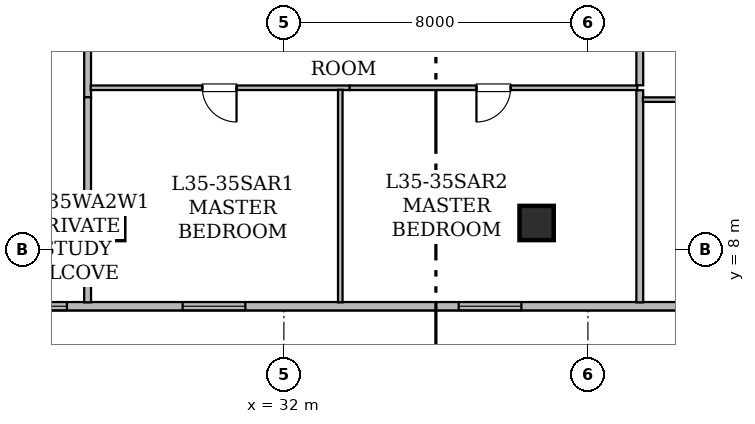
"""IFC4 building model, lengths in metres.
Left out: names, types, materials, properties, quantities, classifications, styles, units other than length and angle.
Written with IfcOpenShell. Run it as: python <this file> out.ifc"""

import sys

from ifc_helpers import new_model, si_unit, direction, frame, frame_2d, origin, origin_2d, place, context, subcontext, project, spatial, rectangle, hollow_rectangle, extrude, element, fill, save


model = new_model("IFC4")
c1 = context("Model", 3, precision=1e-05, world=origin(), true_north=direction((0.0, 1.0)))
c2 = subcontext(c1, "Body", "Model", "MODEL_VIEW")
j1 = project(units=[si_unit("LENGTHUNIT", "METRE"), si_unit("PLANEANGLEUNIT", "RADIAN")], contexts=[c1])
p1 = place(None, origin())
s1 = spatial("IfcSite", under=j1, at=p1, CompositionType="ELEMENT")
p2 = place(p1, origin())
s2 = spatial("IfcBuilding", under=s1, at=p2, CompositionType="ELEMENT")
p3 = place(p2, frame((0.0, 0.0, 138.4)))
s3 = spatial("IfcBuildingStorey", under=s2, at=p3, CompositionType="ELEMENT", Elevation=138.4)
for number, where, z_axis, x_axis in (
    (1, (27.35, 8.7, 0.0), (0.0, 0.0, 1.0), (1.0, 0.0, 0.0)),
    (2, (38.65, 8.7, 0.0), (0.0, 0.0, 1.0), (1.0, 0.0, 0.0)),
):
    element("IfcColumn", number, at=place(p3, frame(where, z_axis=z_axis, x_axis=x_axis)), inside=s3, PredefinedType="COLUMN", context=c2, shape_type="SweptSolid", body=[
        extrude(hollow_rectangle(XDim=0.9, YDim=0.9, WallThickness=0.045, at=origin_2d()), origin(), (0.0, 0.0, 1.0), 3.65),
    ])
p4 = place(p3, frame((52.283, 6.51, 0.0), z_axis=(0.0, 0.0, 1.0), x_axis=(-1.0, 0.0, 0.0)))
e3 = element("IfcWall", 3, at=p4, inside=s3, PredefinedType="STANDARD", context=c2, shape_type="SweptSolid", body=[
    extrude(rectangle(XDim=38.568, YDim=0.22, at=frame_2d((19.284, 0.0))), origin(), (0.0, 0.0, 1.0), 3.43),
])
p5 = place(p4, frame((34.581, 0.0, 0.85)))
e4 = element("IfcOpeningElement", 4, at=p5, cuts=e3, PredefinedType="OPENING", context=c2, shape_type="SweptSolid", body=[
    extrude(rectangle(XDim=1.65, YDim=1.55, at=frame_2d((0.825, 0.775))), frame((0.0, 0.12, 0.0), z_axis=(0.0, -1.0, 0.0), x_axis=(1.0, 0.0, 0.0)), (0.0, 0.0, 1.0), 0.24),
])
p6 = place(p4, frame((25.992, 0.0, 0.85)))
e5 = element("IfcOpeningElement", 5, at=p6, cuts=e3, PredefinedType="OPENING", context=c2, shape_type="SweptSolid", body=[
    extrude(rectangle(XDim=1.65, YDim=1.55, at=frame_2d((0.825, 0.775))), frame((0.0, 0.12, 0.0), z_axis=(0.0, -1.0, 0.0), x_axis=(1.0, 0.0, 0.0)), (0.0, 0.0, 1.0), 0.24),
])
p7 = place(p4, frame((28.375, 0.0, 0.8)))
e6 = element("IfcOpeningElement", 6, at=p7, cuts=e3, PredefinedType="OPENING", context=c2, shape_type="SweptSolid", body=[
    extrude(rectangle(XDim=1.2, YDim=1.5, at=frame_2d((0.6, 0.75))), frame((0.0, 0.12, 0.0), z_axis=(0.0, -1.0, 0.0), x_axis=(1.0, 0.0, 0.0)), (0.0, 0.0, 1.0), 0.24),
])
p8 = place(p4, frame((30.784, 0.0, 0.85)))
e7 = element("IfcOpeningElement", 7, at=p8, cuts=e3, PredefinedType="OPENING", context=c2, shape_type="SweptSolid", body=[
    extrude(rectangle(XDim=1.65, YDim=1.55, at=frame_2d((0.825, 0.775))), frame((0.0, 0.12, 0.0), z_axis=(0.0, -1.0, 0.0), x_axis=(1.0, 0.0, 0.0)), (0.0, 0.0, 1.0), 0.24),
])
p9 = place(p4, frame((21.298, 0.0, 0.85)))
e8 = element("IfcOpeningElement", 8, at=p9, cuts=e3, PredefinedType="OPENING", context=c2, shape_type="SweptSolid", body=[
    extrude(rectangle(XDim=1.65, YDim=1.55, at=frame_2d((0.825, 0.775))), frame((0.0, 0.12, 0.0), z_axis=(0.0, -1.0, 0.0), x_axis=(1.0, 0.0, 0.0)), (0.0, 0.0, 1.0), 0.24),
])
p10 = place(p4, frame((14.033, 0.0, 0.85)))
e9 = element("IfcOpeningElement", 9, at=p10, cuts=e3, PredefinedType="OPENING", context=c2, shape_type="SweptSolid", body=[
    extrude(rectangle(XDim=1.65, YDim=1.55, at=frame_2d((0.825, 0.775))), frame((0.0, 0.12, 0.0), z_axis=(0.0, -1.0, 0.0), x_axis=(1.0, 0.0, 0.0)), (0.0, 0.0, 1.0), 0.24),
])
p11 = place(p4, frame((6.688, 0.0, 0.85)))
e10 = element("IfcOpeningElement", 10, at=p11, cuts=e3, PredefinedType="OPENING", context=c2, shape_type="SweptSolid", body=[
    extrude(rectangle(XDim=1.65, YDim=1.55, at=frame_2d((0.825, 0.775))), frame((0.0, 0.12, 0.0), z_axis=(0.0, -1.0, 0.0), x_axis=(1.0, 0.0, 0.0)), (0.0, 0.0, 1.0), 0.24),
])
p12 = place(p4, frame((0.587, 0.0, 0.85)))
e11 = element("IfcOpeningElement", 11, at=p12, cuts=e3, PredefinedType="OPENING", context=c2, shape_type="SweptSolid", body=[
    extrude(rectangle(XDim=1.65, YDim=1.55, at=frame_2d((0.825, 0.775))), frame((0.0, 0.12, 0.0), z_axis=(0.0, -1.0, 0.0), x_axis=(1.0, 0.0, 0.0)), (0.0, 0.0, 1.0), 0.24),
])
p13 = place(p3, frame((26.835, 14.087, 0.0), z_axis=(0.0, 0.0, 1.0), x_axis=(0.0, -1.0, 0.0)))
e12 = element("IfcWall", 12, at=p13, inside=s3, PredefinedType="STANDARD", context=c2, shape_type="SweptSolid", body=[
    extrude(rectangle(XDim=2.078, YDim=0.18, at=frame_2d((1.039, 0.0))), origin(), (0.0, 0.0, 1.0), 3.43),
])
p14 = place(p3, frame((26.835, 12.009, 0.0), z_axis=(0.0, 0.0, 1.0), x_axis=(0.0, -1.0, 0.0)))
e13 = element("IfcWall", 13, at=p14, inside=s3, PredefinedType="STANDARD", context=c2, shape_type="SweptSolid", body=[
    extrude(rectangle(XDim=5.397, YDim=0.18, at=frame_2d((2.698, 0.0))), origin(), (0.0, 0.0, 1.0), 2.876),
])
p15 = place(p3, frame((33.734, 12.258, 0.0), z_axis=(0.0, 0.0, 1.0), x_axis=(-1.0, 0.0, 0.0)))
e14 = element("IfcWall", 14, at=p15, inside=s3, PredefinedType="PARTITIONING", context=c2, shape_type="SweptSolid", body=[
    extrude(rectangle(XDim=6.817, YDim=0.12, at=frame_2d((3.408, 0.0))), origin(), (0.0, 0.0, 1.0), 2.647),
])
p16 = place(p15, frame((2.98, 0.0, 0.0)))
e15 = element("IfcOpeningElement", 15, at=p16, cuts=e14, PredefinedType="OPENING", context=c2, shape_type="SweptSolid", body=[
    extrude(rectangle(XDim=0.9, YDim=2.1, at=frame_2d((0.45, 1.05))), frame((0.0, 0.07, 0.0), z_axis=(0.0, -1.0, 0.0), x_axis=(1.0, 0.0, 0.0)), (0.0, 0.0, 1.0), 0.14),
])
p17 = place(p3, frame((41.3, 12.258, 0.0), z_axis=(0.0, 0.0, 1.0), x_axis=(-1.0, 0.0, 0.0)))
e16 = element("IfcWall", 16, at=p17, inside=s3, PredefinedType="PARTITIONING", context=c2, shape_type="SweptSolid", body=[
    extrude(rectangle(XDim=7.566, YDim=0.12, at=frame_2d((3.783, 0.0))), origin(), (0.0, 0.0, 1.0), 2.647),
])
p18 = place(p17, frame((3.333, 0.0, 0.0)))
e17 = element("IfcOpeningElement", 17, at=p18, cuts=e16, PredefinedType="OPENING", context=c2, shape_type="SweptSolid", body=[
    extrude(rectangle(XDim=0.9, YDim=2.1, at=frame_2d((0.45, 1.05))), frame((0.0, 0.07, 0.0), z_axis=(0.0, -1.0, 0.0), x_axis=(1.0, 0.0, 0.0)), (0.0, 0.0, 1.0), 0.14),
])
p19 = place(p3, frame((41.365, 13.773, 0.0), z_axis=(0.0, 0.0, 1.0), x_axis=(0.0, -1.0, 0.0)))
e18 = element("IfcWall", 18, at=p19, inside=s3, PredefinedType="STANDARD", context=c2, shape_type="SweptSolid", body=[
    extrude(rectangle(XDim=1.45, YDim=0.18, at=frame_2d((0.725, 0.0))), origin(), (0.0, 0.0, 1.0), 3.43),
])
p20 = place(p3, frame((33.484, 12.204, 0.0), z_axis=(0.0, 0.0, 1.0), x_axis=(0.0, -1.0, 0.0)))
e19 = element("IfcWall", 19, at=p20, inside=s3, PredefinedType="PARTITIONING", context=c2, shape_type="SweptSolid", body=[
    extrude(rectangle(XDim=5.592, YDim=0.12, at=frame_2d((2.796, 0.0))), origin(), (0.0, 0.0, 1.0), 2.876),
])
p21 = place(p3, frame((41.365, 12.193, 0.0), z_axis=(0.0, 0.0, 1.0), x_axis=(0.0, -1.0, 0.0)))
e20 = element("IfcWall", 20, at=p21, inside=s3, PredefinedType="STANDARD", context=c2, shape_type="SweptSolid", body=[
    extrude(rectangle(XDim=5.581, YDim=0.18, at=frame_2d((2.791, 0.0))), origin(), (0.0, 0.0, 1.0), 2.876),
])
p22 = place(p3, frame((41.447, 11.946, 0.0), z_axis=(0.0, 0.0, 1.0), x_axis=(1.0, 0.0, 0.0)))
e21 = element("IfcWall", 21, at=p22, inside=s3, PredefinedType="PARTITIONING", context=c2, shape_type="SweptSolid", body=[
    extrude(rectangle(XDim=6.674, YDim=0.12, at=frame_2d((3.337, 0.0))), origin(), (0.0, 0.0, 1.0), 3.43),
])
p23 = place(p6, origin())
e22 = element("IfcWindow", 22, at=p23, inside=s3, PartitioningType="SINGLE_PANEL", PredefinedType="WINDOW", context=c2, shape_type="SweptSolid", body=[
    extrude(rectangle(XDim=1.65, YDim=1.55, at=frame_2d((0.825, 0.775))), frame((0.0, 0.03, 0.0), z_axis=(0.0, -1.0, 0.0), x_axis=(1.0, 0.0, 0.0)), (0.0, 0.0, 1.0), 0.06),
])
fill(e5, e22)
p24 = place(p9, origin())
e23 = element("IfcWindow", 23, at=p24, inside=s3, PartitioningType="SINGLE_PANEL", PredefinedType="WINDOW", context=c2, shape_type="SweptSolid", body=[
    extrude(rectangle(XDim=1.65, YDim=1.55, at=frame_2d((0.825, 0.775))), frame((0.0, 0.03, 0.0), z_axis=(0.0, -1.0, 0.0), x_axis=(1.0, 0.0, 0.0)), (0.0, 0.0, 1.0), 0.06),
])
fill(e8, e23)
p25 = place(p10, origin())
e24 = element("IfcWindow", 24, at=p25, inside=s3, PartitioningType="SINGLE_PANEL", PredefinedType="WINDOW", context=c2, shape_type="SweptSolid", body=[
    extrude(rectangle(XDim=1.65, YDim=1.55, at=frame_2d((0.825, 0.775))), frame((0.0, 0.03, 0.0), z_axis=(0.0, -1.0, 0.0), x_axis=(1.0, 0.0, 0.0)), (0.0, 0.0, 1.0), 0.06),
])
fill(e9, e24)
p26 = place(p16, origin())
e25 = element("IfcDoor", 25, at=p26, inside=s3, OperationType="SINGLE_SWING_LEFT", PredefinedType="DOOR", context=c2, shape_type="SweptSolid", body=[
    extrude(rectangle(XDim=0.9, YDim=2.1, at=frame_2d((0.45, 1.05))), frame((0.0, 0.025, 0.0), z_axis=(0.0, -1.0, 0.0), x_axis=(1.0, 0.0, 0.0)), (0.0, 0.0, 1.0), 0.05),
])
fill(e15, e25)
p27 = place(p18, origin())
e26 = element("IfcDoor", 26, at=p27, inside=s3, OperationType="SINGLE_SWING_RIGHT", PredefinedType="DOOR", context=c2, shape_type="SweptSolid", body=[
    extrude(rectangle(XDim=0.9, YDim=2.1, at=frame_2d((0.45, 1.05))), frame((0.0, 0.025, 0.0), z_axis=(0.0, -1.0, 0.0), x_axis=(1.0, 0.0, 0.0)), (0.0, 0.0, 1.0), 0.05),
])
fill(e17, e26)
save(model, sys.argv[1])
